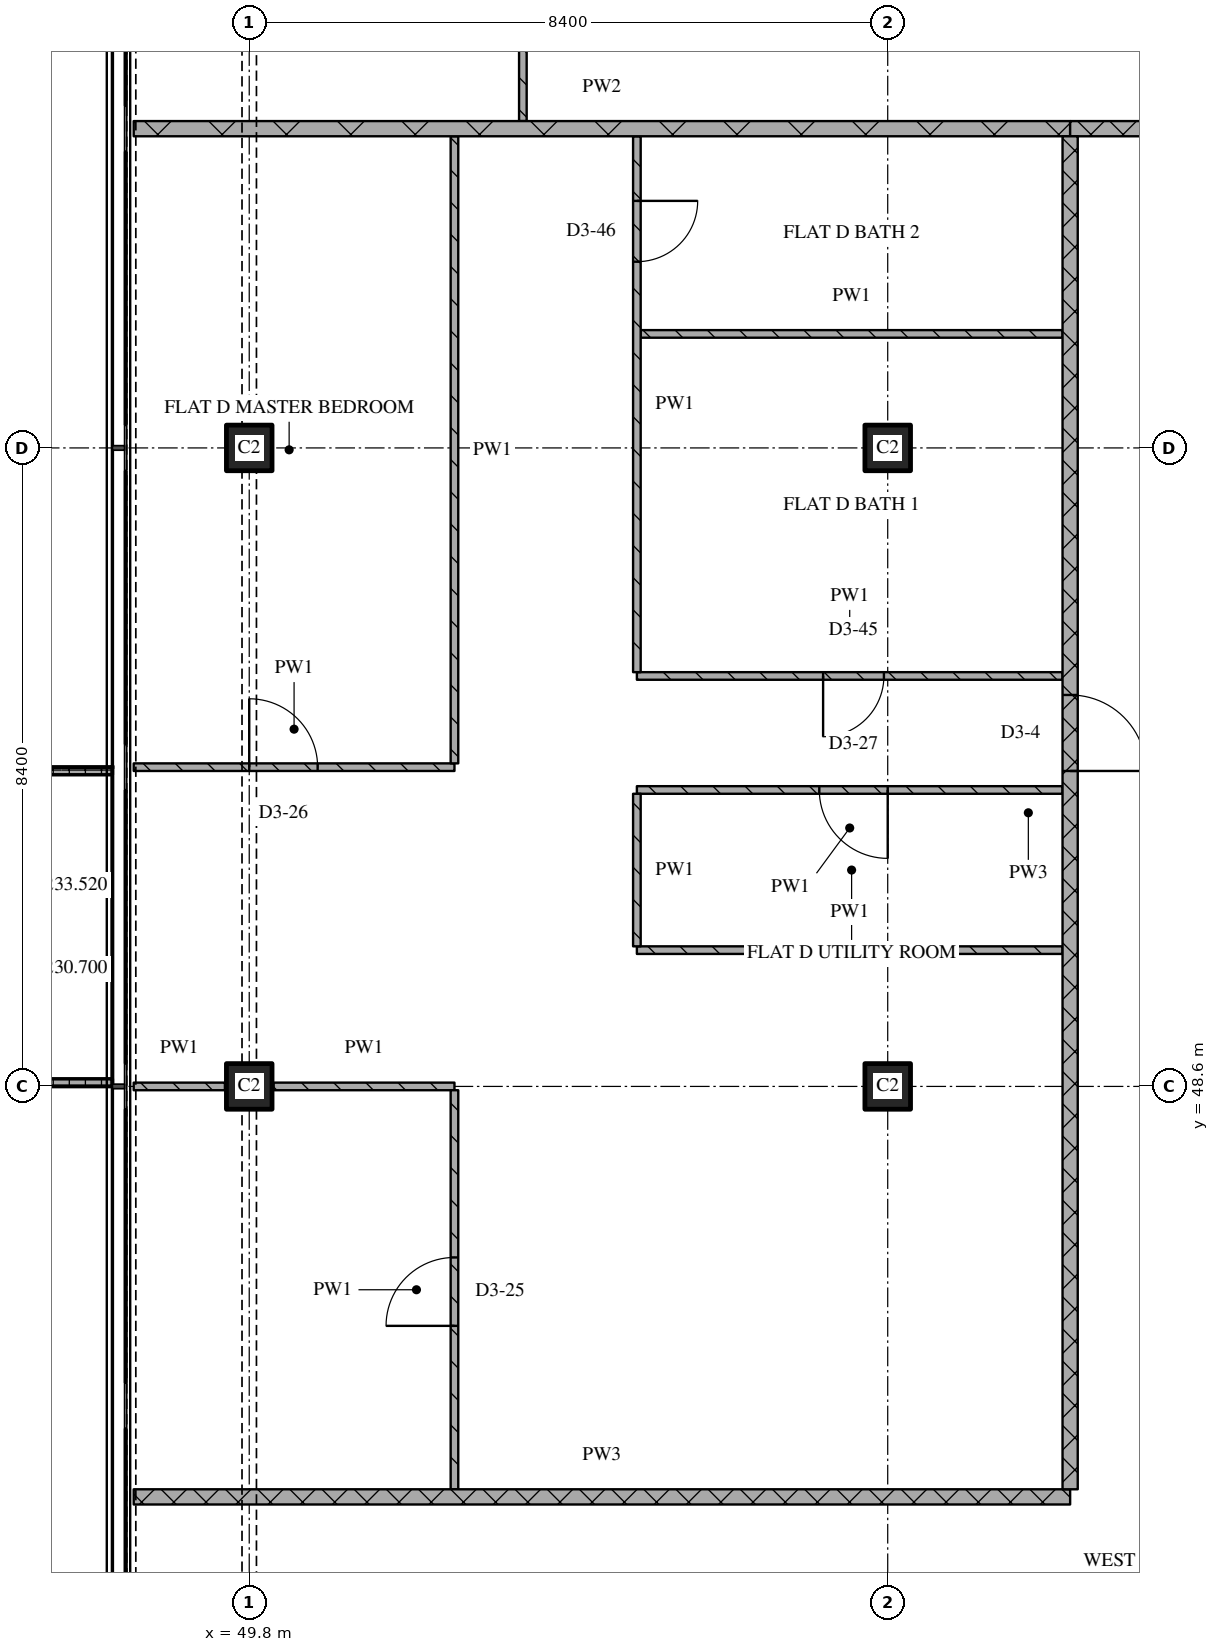
"""IFC4 building model, lengths in metres.
Left out: names, types, materials, properties, quantities, classifications, styles, units other than length and angle.
Written with IfcOpenShell. Run it as: python <this file> out.ifc"""

import sys

from ifc_helpers import new_model, si_unit, direction, frame, frame_2d, origin, origin_2d, place, context, subcontext, project, spatial, polyline, rectangle, outline, extrude, element, fill, save


model = new_model("IFC4")
c1 = context("Model", 3, precision=1e-05, world=origin(), true_north=direction((0.0, 1.0)))
c2 = subcontext(c1, "Body", "Model", "MODEL_VIEW")
j1 = project(units=[si_unit("LENGTHUNIT", "METRE"), si_unit("PLANEANGLEUNIT", "RADIAN")], contexts=[c1])
p1 = place(None, origin())
s1 = spatial("IfcSite", under=j1, at=p1, CompositionType="ELEMENT")
p2 = place(p1, origin())
s2 = spatial("IfcBuilding", under=s1, at=p2, CompositionType="ELEMENT")
p3 = place(p2, frame((0.0, 0.0, 230.7)))
s3 = spatial("IfcBuildingStorey", under=s2, at=p3, CompositionType="ELEMENT", Elevation=230.7)
for number, where, z_axis, x_axis in (
    (1, (49.8, 48.6, 0.0), (0.0, 0.0, 1.0), (1.0, 0.0, 0.0)),
    (2, (49.8, 57.0, 0.0), (0.0, 0.0, 1.0), (1.0, 0.0, 0.0)),
    (3, (58.2, 48.6, 0.0), (0.0, 0.0, 1.0), (1.0, 0.0, 0.0)),
    (4, (58.2, 57.0, 0.0), (0.0, 0.0, 1.0), (1.0, 0.0, 0.0)),
):
    element("IfcColumn", number, at=place(p3, frame(where, z_axis=z_axis, x_axis=x_axis)), inside=s3, PredefinedType="COLUMN", context=c2, shape_type="SweptSolid", body=[
        extrude(rectangle(XDim=0.6, YDim=0.6, at=origin_2d()), origin(), (0.0, 0.0, 1.0), 3.6),
    ])
p4 = place(p3, origin())
e5 = element("IfcWall", 5, at=p4, inside=s3, PredefinedType="SOLIDWALL", context=c2, shape_type="SweptSolid", body=[
    extrude(outline(polyline([(48.0, 52.8), (48.0, 52.7), (46.367, 52.7), (46.367, 48.7), (48.0, 48.7), (48.0, 48.6), (46.267, 48.6), (46.267, 52.8), (48.0, 52.8)])), origin(), (0.0, 0.0, 1.0), 1.0),
])
p5 = place(p3, frame((48.28, 43.2, 0.0), z_axis=(0.0, 0.0, 1.0), x_axis=(1.0, 0.0, 0.0)))
e6 = element("IfcWall", 6, at=p5, inside=s3, PredefinedType="PARTITIONING", context=c2, shape_type="SweptSolid", body=[
    extrude(rectangle(XDim=12.32, YDim=0.2, at=frame_2d((6.16, 0.0))), origin(), (0.0, 0.0, 1.0), 3.32),
])
p6 = place(p3, frame((48.28, 48.6, 0.0), z_axis=(0.0, 0.0, 1.0), x_axis=(1.0, 0.0, 0.0)))
e7 = element("IfcWall", 7, at=p6, inside=s3, PredefinedType="PARTITIONING", context=c2, shape_type="SweptSolid", body=[
    extrude(rectangle(XDim=1.2, YDim=0.1, at=frame_2d((0.6, 0.0))), origin(), (0.0, 0.0, 1.0), 3.32),
])
p7 = place(p3, frame((50.12, 48.6, 0.0), z_axis=(0.0, 0.0, 1.0), x_axis=(1.0, 0.0, 0.0)))
e8 = element("IfcWall", 8, at=p7, inside=s3, PredefinedType="PARTITIONING", context=c2, shape_type="SweptSolid", body=[
    extrude(rectangle(XDim=2.38, YDim=0.1, at=frame_2d((1.19, 0.0))), origin(), (0.0, 0.0, 1.0), 3.32),
])
p8 = place(p3, frame((54.9, 50.393, 0.0), z_axis=(0.0, 0.0, 1.0), x_axis=(1.0, 0.0, 0.0)))
e9 = element("IfcWall", 9, at=p8, inside=s3, PredefinedType="PARTITIONING", context=c2, shape_type="SweptSolid", body=[
    extrude(rectangle(XDim=5.6, YDim=0.1, at=frame_2d((2.8, 0.0))), origin(), (0.0, 0.0, 1.0), 3.32),
])
p9 = place(p3, frame((60.5, 52.5, 0.0), z_axis=(0.0, 0.0, 1.0), x_axis=(-1.0, 0.0, 0.0)))
e10 = element("IfcWall", 10, at=p9, inside=s3, PredefinedType="PARTITIONING", context=c2, shape_type="SweptSolid", body=[
    extrude(rectangle(XDim=5.6, YDim=0.1, at=frame_2d((2.8, 0.0))), origin(), (0.0, 0.0, 1.0), 3.32),
])
p10 = place(p9, frame((2.3, 0.0, 0.0)))
e11 = element("IfcOpeningElement", 11, at=p10, cuts=e10, PredefinedType="OPENING", context=c2, shape_type="SweptSolid", body=[
    extrude(rectangle(XDim=0.9, YDim=2.1, at=frame_2d((0.45, 1.05))), frame((0.0, 0.06, 0.0), z_axis=(0.0, -1.0, 0.0), x_axis=(1.0, 0.0, 0.0)), (0.0, 0.0, 1.0), 0.12),
])
p11 = place(p3, frame((48.28, 52.8, 0.0), z_axis=(0.0, 0.0, 1.0), x_axis=(1.0, 0.0, 0.0)))
e12 = element("IfcWall", 12, at=p11, inside=s3, PredefinedType="PARTITIONING", context=c2, shape_type="SweptSolid", body=[
    extrude(rectangle(XDim=4.22, YDim=0.1, at=frame_2d((2.11, 0.0))), origin(), (0.0, 0.0, 1.0), 3.32),
])
p12 = place(p11, frame((1.52, 0.0, 0.0)))
e13 = element("IfcOpeningElement", 13, at=p12, cuts=e12, PredefinedType="OPENING", context=c2, shape_type="SweptSolid", body=[
    extrude(rectangle(XDim=0.9, YDim=2.1, at=frame_2d((0.45, 1.05))), frame((0.0, 0.06, 0.0), z_axis=(0.0, -1.0, 0.0), x_axis=(1.0, 0.0, 0.0)), (0.0, 0.0, 1.0), 0.12),
])
p13 = place(p3, frame((54.9, 54.0, 0.0), z_axis=(0.0, 0.0, 1.0), x_axis=(1.0, 0.0, 0.0)))
e14 = element("IfcWall", 14, at=p13, inside=s3, PredefinedType="PARTITIONING", context=c2, shape_type="SweptSolid", body=[
    extrude(rectangle(XDim=5.6, YDim=0.1, at=frame_2d((2.8, 0.0))), origin(), (0.0, 0.0, 1.0), 3.32),
])
p14 = place(p13, frame((2.45, 0.0, 0.0)))
e15 = element("IfcOpeningElement", 15, at=p14, cuts=e14, PredefinedType="OPENING", context=c2, shape_type="SweptSolid", body=[
    extrude(rectangle(XDim=0.8, YDim=2.1, at=frame_2d((0.4, 1.05))), frame((0.0, 0.06, 0.0), z_axis=(0.0, -1.0, 0.0), x_axis=(1.0, 0.0, 0.0)), (0.0, 0.0, 1.0), 0.12),
])
p15 = place(p3, frame((54.95, 58.5, 0.0), z_axis=(0.0, 0.0, 1.0), x_axis=(1.0, 0.0, 0.0)))
e16 = element("IfcWall", 16, at=p15, inside=s3, PredefinedType="PARTITIONING", context=c2, shape_type="SweptSolid", body=[
    extrude(rectangle(XDim=5.55, YDim=0.1, at=frame_2d((2.775, 0.0))), origin(), (0.0, 0.0, 1.0), 3.32),
])
p16 = place(p3, frame((60.6, 61.2, 0.0), z_axis=(0.0, 0.0, 1.0), x_axis=(1.0, 0.0, 0.0)))
e17 = element("IfcWall", 17, at=p16, inside=s3, PredefinedType="PARTITIONING", context=c2, shape_type="SweptSolid", body=[
    extrude(rectangle(XDim=3.6, YDim=0.2, at=frame_2d((1.8, 0.0))), origin(), (0.0, 0.0, 1.0), 3.32),
])
p17 = place(p3, frame((48.28, 61.2, 0.0), z_axis=(0.0, 0.0, 1.0), x_axis=(1.0, 0.0, 0.0)))
e18 = element("IfcWall", 18, at=p17, inside=s3, PredefinedType="PARTITIONING", context=c2, shape_type="SweptSolid", body=[
    extrude(rectangle(XDim=12.32, YDim=0.2, at=frame_2d((6.16, 0.0))), origin(), (0.0, 0.0, 1.0), 3.32),
])
p18 = place(p3, frame((52.5, 43.3, 0.0), z_axis=(0.0, 0.0, 1.0), x_axis=(0.0, 1.0, 0.0)))
e19 = element("IfcWall", 19, at=p18, inside=s3, PredefinedType="PARTITIONING", context=c2, shape_type="SweptSolid", body=[
    extrude(rectangle(XDim=5.25, YDim=0.1, at=frame_2d((2.625, 0.0))), origin(), (0.0, 0.0, 1.0), 3.32),
])
p19 = place(p18, frame((2.15, 0.0, 0.0)))
e20 = element("IfcOpeningElement", 20, at=p19, cuts=e19, PredefinedType="OPENING", context=c2, shape_type="SweptSolid", body=[
    extrude(rectangle(XDim=0.9, YDim=2.1, at=frame_2d((0.45, 1.05))), frame((0.0, 0.06, 0.0), z_axis=(0.0, -1.0, 0.0), x_axis=(1.0, 0.0, 0.0)), (0.0, 0.0, 1.0), 0.12),
])
p20 = place(p3, frame((52.5, 61.1, 0.0), z_axis=(0.0, 0.0, 1.0), x_axis=(0.0, -1.0, 0.0)))
e21 = element("IfcWall", 21, at=p20, inside=s3, PredefinedType="PARTITIONING", context=c2, shape_type="SweptSolid", body=[
    extrude(rectangle(XDim=8.25, YDim=0.1, at=frame_2d((4.125, 0.0))), origin(), (0.0, 0.0, 1.0), 3.32),
])
p21 = place(p3, frame((53.4, 61.3, 0.0), z_axis=(0.0, 0.0, 1.0), x_axis=(0.0, 1.0, 0.0)))
e22 = element("IfcWall", 22, at=p21, inside=s3, PredefinedType="PARTITIONING", context=c2, shape_type="SweptSolid", body=[
    extrude(rectangle(XDim=8.25, YDim=0.1, at=frame_2d((4.125, 0.0))), origin(), (0.0, 0.0, 1.0), 3.32),
])
p22 = place(p21, frame((3.65, 0.0, 0.0)))
e23 = element("IfcOpeningElement", 23, at=p22, cuts=e22, PredefinedType="OPENING", context=c2, shape_type="SweptSolid", body=[
    extrude(rectangle(XDim=0.9, YDim=2.1, at=frame_2d((0.45, 1.05))), frame((0.0, 0.06, 0.0), z_axis=(0.0, -1.0, 0.0), x_axis=(1.0, 0.0, 0.0)), (0.0, 0.0, 1.0), 0.12),
])
p23 = place(p3, frame((54.9, 52.45, 0.0), z_axis=(0.0, 0.0, 1.0), x_axis=(0.0, -1.0, 0.0)))
e24 = element("IfcWall", 24, at=p23, inside=s3, PredefinedType="PARTITIONING", context=c2, shape_type="SweptSolid", body=[
    extrude(rectangle(XDim=2.007, YDim=0.1, at=frame_2d((1.003, 0.0))), origin(), (0.0, 0.0, 1.0), 3.32),
])
p24 = place(p3, frame((54.9, 61.1, 0.0), z_axis=(0.0, 0.0, 1.0), x_axis=(0.0, -1.0, 0.0)))
e25 = element("IfcWall", 25, at=p24, inside=s3, PredefinedType="PARTITIONING", context=c2, shape_type="SweptSolid", body=[
    extrude(rectangle(XDim=7.05, YDim=0.1, at=frame_2d((3.525, 0.0))), origin(), (0.0, 0.0, 1.0), 3.32),
])
p25 = place(p24, frame((0.85, 0.0, 0.0)))
e26 = element("IfcOpeningElement", 26, at=p25, cuts=e25, PredefinedType="OPENING", context=c2, shape_type="SweptSolid", body=[
    extrude(rectangle(XDim=0.8, YDim=2.1, at=frame_2d((0.4, 1.05))), frame((0.0, 0.06, 0.0), z_axis=(0.0, -1.0, 0.0), x_axis=(1.0, 0.0, 0.0)), (0.0, 0.0, 1.0), 0.12),
])
p26 = place(p3, frame((60.6, 43.3, 0.0), z_axis=(0.0, 0.0, 1.0), x_axis=(0.0, 1.0, 0.0)))
e27 = element("IfcWall", 27, at=p26, inside=s3, PredefinedType="PARTITIONING", context=c2, shape_type="SweptSolid", body=[
    extrude(rectangle(XDim=17.8, YDim=0.2, at=frame_2d((8.9, 0.0))), origin(), (0.0, 0.0, 1.0), 3.32),
])
p27 = place(p26, frame((9.45, 0.0, 0.0)))
e28 = element("IfcOpeningElement", 28, at=p27, cuts=e27, PredefinedType="OPENING", context=c2, shape_type="SweptSolid", body=[
    extrude(rectangle(XDim=1.0, YDim=2.1, at=frame_2d((0.5, 1.05))), frame((0.0, 0.11, 0.0), z_axis=(0.0, -1.0, 0.0), x_axis=(1.0, 0.0, 0.0)), (0.0, 0.0, 1.0), 0.22),
])
p28 = place(p10, origin())
e29 = element("IfcDoor", 29, at=p28, inside=s3, OperationType="SINGLE_SWING_LEFT", PredefinedType="DOOR", context=c2, shape_type="SweptSolid", body=[
    extrude(rectangle(XDim=0.9, YDim=2.1, at=frame_2d((0.45, 1.05))), frame((0.0, 0.025, 0.0), z_axis=(0.0, -1.0, 0.0), x_axis=(1.0, 0.0, 0.0)), (0.0, 0.0, 1.0), 0.05),
])
fill(e11, e29)
p29 = place(p12, origin())
e30 = element("IfcDoor", 30, at=p29, inside=s3, OperationType="SINGLE_SWING_LEFT", PredefinedType="DOOR", context=c2, shape_type="SweptSolid", body=[
    extrude(rectangle(XDim=0.9, YDim=2.1, at=frame_2d((0.45, 1.05))), frame((0.0, 0.025, 0.0), z_axis=(0.0, -1.0, 0.0), x_axis=(1.0, 0.0, 0.0)), (0.0, 0.0, 1.0), 0.05),
])
fill(e13, e30)
p30 = place(p14, origin())
e31 = element("IfcDoor", 31, at=p30, inside=s3, OperationType="SINGLE_SWING_RIGHT", PredefinedType="DOOR", context=c2, shape_type="SweptSolid", body=[
    extrude(rectangle(XDim=0.8, YDim=2.1, at=frame_2d((0.4, 1.05))), frame((0.0, 0.025, 0.0), z_axis=(0.0, -1.0, 0.0), x_axis=(1.0, 0.0, 0.0)), (0.0, 0.0, 1.0), 0.05),
])
fill(e15, e31)
p31 = place(p19, origin())
e32 = element("IfcDoor", 32, at=p31, inside=s3, OperationType="SINGLE_SWING_LEFT", PredefinedType="DOOR", context=c2, shape_type="SweptSolid", body=[
    extrude(rectangle(XDim=0.9, YDim=2.1, at=frame_2d((0.45, 1.05))), frame((0.0, 0.025, 0.0), z_axis=(0.0, -1.0, 0.0), x_axis=(1.0, 0.0, 0.0)), (0.0, 0.0, 1.0), 0.05),
])
fill(e20, e32)
p32 = place(p25, origin())
e33 = element("IfcDoor", 33, at=p32, inside=s3, OperationType="SINGLE_SWING_LEFT", PredefinedType="DOOR", context=c2, shape_type="SweptSolid", body=[
    extrude(rectangle(XDim=0.8, YDim=2.1, at=frame_2d((0.4, 1.05))), frame((0.0, 0.025, 0.0), z_axis=(0.0, -1.0, 0.0), x_axis=(1.0, 0.0, 0.0)), (0.0, 0.0, 1.0), 0.05),
])
fill(e26, e33)
p33 = place(p27, origin())
e34 = element("IfcDoor", 34, at=p33, inside=s3, OperationType="SINGLE_SWING_RIGHT", PredefinedType="DOOR", context=c2, shape_type="SweptSolid", body=[
    extrude(rectangle(XDim=1.0, YDim=2.1, at=frame_2d((0.5, 1.05))), frame((0.0, 0.025, 0.0), z_axis=(0.0, -1.0, 0.0), x_axis=(1.0, 0.0, 0.0)), (0.0, 0.0, 1.0), 0.05),
])
fill(e28, e34)
save(model, sys.argv[1])
